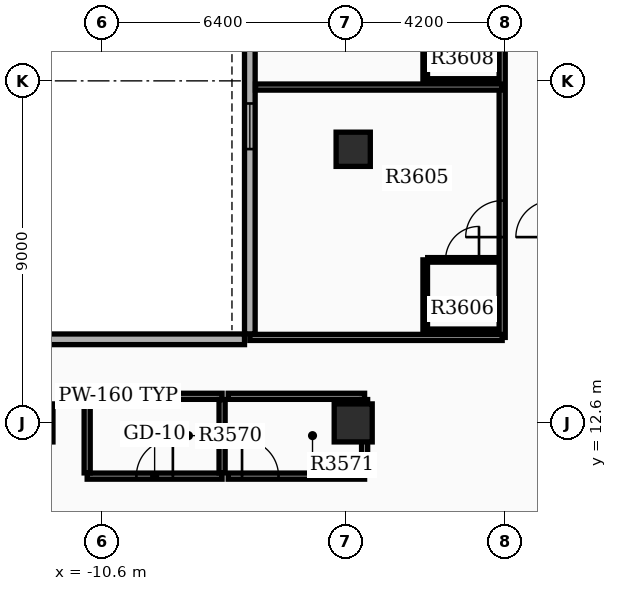
"""IFC4 building model, lengths in metres.
Left out: names, types, materials, properties, quantities, classifications, styles, units other than length and angle.
Written with IfcOpenShell. Run it as: python <this file> out.ifc"""

import sys

from ifc_helpers import new_model, si_unit, direction, frame, frame_2d, origin, origin_2d, place, context, subcontext, project, spatial, rectangle, extrude, element, fill, save


model = new_model("IFC4")
c1 = context("Model", 3, precision=1e-05, world=origin(), true_north=direction((0.0, 1.0)))
c2 = subcontext(c1, "Body", "Model", "MODEL_VIEW")
j1 = project(units=[si_unit("LENGTHUNIT", "METRE"), si_unit("PLANEANGLEUNIT", "RADIAN")], contexts=[c1])
p1 = place(None, origin())
s1 = spatial("IfcSite", under=j1, at=p1, CompositionType="ELEMENT")
p2 = place(p1, origin())
s2 = spatial("IfcBuilding", under=s1, at=p2, CompositionType="ELEMENT")
p3 = place(p2, frame((0.0, 0.0, 224.7)))
s3 = spatial("IfcBuildingStorey", under=s2, at=p3, CompositionType="ELEMENT", Elevation=224.7)
for number, where, z_axis, x_axis in (
    (1, (-12.4, 12.6, 0.0), (0.0, 0.0, 1.0), (1.0, 0.0, 0.0)),
    (2, (-4.0, 12.6, 0.0), (0.0, 0.0, 1.0), (1.0, 0.0, 0.0)),
):
    element("IfcColumn", number, at=place(p3, frame(where, z_axis=z_axis, x_axis=x_axis)), inside=s3, PredefinedType="COLUMN", context=c2, shape_type="SweptSolid", body=[
        extrude(rectangle(XDim=1.0, YDim=1.0, at=origin_2d()), origin(), (0.0, 0.0, 1.0), 3.9),
    ])
p4 = place(p3, frame((-4.0, 19.8, 0.0), z_axis=(0.0, 0.0, 1.0), x_axis=(1.0, 0.0, 0.0)))
e3 = element("IfcColumn", 3, at=p4, inside=s3, PredefinedType="COLUMN", context=c2, shape_type="SweptSolid", body=[
    extrude(rectangle(XDim=0.9, YDim=0.9, at=origin_2d()), origin(), (0.0, 0.0, 1.0), 3.9),
])
p5 = place(p3, frame((-6.72, 35.04, 0.0), z_axis=(0.0, 0.0, 1.0), x_axis=(0.0, -1.0, 0.0)))
e4 = element("IfcWall", 4, at=p5, inside=s3, PredefinedType="STANDARD", context=c2, shape_type="SweptSolid", body=[
    extrude(rectangle(XDim=20.1, YDim=0.28, at=frame_2d((10.05, 0.0))), origin(), (0.0, 0.0, 1.0), 3.18),
])
p6 = place(p5, frame((0.85, 0.0, 0.8)))
e5 = element("IfcOpeningElement", 5, at=p6, cuts=e4, PredefinedType="OPENING", context=c2, shape_type="SweptSolid", body=[
    extrude(rectangle(XDim=1.2, YDim=1.6, at=frame_2d((0.6, 0.8))), frame((0.0, 0.15, 0.0), z_axis=(0.0, -1.0, 0.0), x_axis=(1.0, 0.0, 0.0)), (0.0, 0.0, 1.0), 0.3),
])
p7 = place(p5, frame((4.05, 0.0, 0.8)))
e6 = element("IfcOpeningElement", 6, at=p7, cuts=e4, PredefinedType="OPENING", context=c2, shape_type="SweptSolid", body=[
    extrude(rectangle(XDim=1.2, YDim=1.6, at=frame_2d((0.6, 0.8))), frame((0.0, 0.15, 0.0), z_axis=(0.0, -1.0, 0.0), x_axis=(1.0, 0.0, 0.0)), (0.0, 0.0, 1.0), 0.3),
])
p8 = place(p5, frame((7.25, 0.0, 0.8)))
e7 = element("IfcOpeningElement", 7, at=p8, cuts=e4, PredefinedType="OPENING", context=c2, shape_type="SweptSolid", body=[
    extrude(rectangle(XDim=1.2, YDim=1.6, at=frame_2d((0.6, 0.8))), frame((0.0, 0.15, 0.0), z_axis=(0.0, -1.0, 0.0), x_axis=(1.0, 0.0, 0.0)), (0.0, 0.0, 1.0), 0.3),
])
p9 = place(p5, frame((10.45, 0.0, 0.8)))
e8 = element("IfcOpeningElement", 8, at=p9, cuts=e4, PredefinedType="OPENING", context=c2, shape_type="SweptSolid", body=[
    extrude(rectangle(XDim=1.2, YDim=1.6, at=frame_2d((0.6, 0.8))), frame((0.0, 0.15, 0.0), z_axis=(0.0, -1.0, 0.0), x_axis=(1.0, 0.0, 0.0)), (0.0, 0.0, 1.0), 0.3),
])
p10 = place(p5, frame((14.035, 0.0, 0.85)))
e9 = element("IfcOpeningElement", 9, at=p10, cuts=e4, PredefinedType="OPENING", context=c2, shape_type="SweptSolid", body=[
    extrude(rectangle(XDim=1.2, YDim=1.6, at=frame_2d((0.6, 0.8))), frame((0.0, 0.15, 0.0), z_axis=(0.0, -1.0, 0.0), x_axis=(1.0, 0.0, 0.0)), (0.0, 0.0, 1.0), 0.3),
])
p11 = place(p3, frame((-13.16, 14.8, 0.0), z_axis=(0.0, 0.0, 1.0), x_axis=(1.0, 0.0, 0.0)))
e10 = element("IfcWall", 10, at=p11, inside=s3, PredefinedType="STANDARD", context=c2, shape_type="SweptSolid", body=[
    extrude(rectangle(XDim=6.3, YDim=0.28, at=frame_2d((3.15, 0.0))), origin(), (0.0, 0.0, 1.0), 3.18),
])
p12 = place(p3, frame((-11.0, 11.2, 0.0), z_axis=(0.0, 0.0, 1.0), x_axis=(1.0, 0.0, 0.0)))
e11 = element("IfcWall", 11, at=p12, inside=s3, PredefinedType="PARTITIONING", context=c2, shape_type="SweptSolid", body=[
    extrude(rectangle(XDim=3.55, YDim=0.16, at=frame_2d((1.775, 0.0))), origin(), (0.0, 0.0, 1.0), 3.17),
])
p13 = place(p12, frame((1.295, 0.0, 0.0)))
e12 = element("IfcOpeningElement", 12, at=p13, cuts=e11, PredefinedType="OPENING", context=c2, shape_type="SweptSolid", body=[
    extrude(rectangle(XDim=0.96, YDim=2.15, at=frame_2d((0.48, 1.075))), frame((0.0, 0.09, 0.0), z_axis=(0.0, -1.0, 0.0), x_axis=(1.0, 0.0, 0.0)), (0.0, 0.0, 1.0), 0.18),
])
p14 = place(p3, frame((-11.0, 13.3, 0.0), z_axis=(0.0, 0.0, 1.0), x_axis=(1.0, 0.0, 0.0)))
e13 = element("IfcWall", 13, at=p14, inside=s3, PredefinedType="PARTITIONING", context=c2, shape_type="SweptSolid", body=[
    extrude(rectangle(XDim=3.55, YDim=0.16, at=frame_2d((1.775, 0.0))), origin(), (0.0, 0.0, 1.0), 3.17),
])
for number, where, z_axis, x_axis in (
    (14, (-11.0, 11.285, 0.0), (0.0, 0.0, 1.0), (0.0, 1.0, 0.0)),
    (15, (-7.45, 11.285, 0.0), (0.0, 0.0, 1.0), (0.0, 1.0, 0.0)),
):
    element("IfcWall", number, at=place(p3, frame(where, z_axis=z_axis, x_axis=x_axis)), inside=s3, PredefinedType="PARTITIONING", context=c2, shape_type="SweptSolid", body=[
        extrude(rectangle(XDim=1.93, YDim=0.16, at=frame_2d((0.965, 0.0))), origin(), (0.0, 0.0, 1.0), 3.17),
    ])
p15 = place(p3, frame((-7.29, 11.2, 0.0), z_axis=(0.0, 0.0, 1.0), x_axis=(1.0, 0.0, 0.0)))
e16 = element("IfcWall", 16, at=p15, inside=s3, PredefinedType="PARTITIONING", context=c2, shape_type="SweptSolid", body=[
    extrude(rectangle(XDim=3.59, YDim=0.16, at=frame_2d((1.795, 0.0))), origin(), (0.0, 0.0, 1.0), 3.17),
])
p16 = place(p15, frame((0.365, 0.0, 0.0)))
e17 = element("IfcOpeningElement", 17, at=p16, cuts=e16, PredefinedType="OPENING", context=c2, shape_type="SweptSolid", body=[
    extrude(rectangle(XDim=0.96, YDim=2.15, at=frame_2d((0.48, 1.075))), frame((0.0, 0.09, 0.0), z_axis=(0.0, -1.0, 0.0), x_axis=(1.0, 0.0, 0.0)), (0.0, 0.0, 1.0), 0.18),
])
p17 = place(p3, frame((-7.29, 13.3, 0.0), z_axis=(0.0, 0.0, 1.0), x_axis=(1.0, 0.0, 0.0)))
e18 = element("IfcWall", 18, at=p17, inside=s3, PredefinedType="PARTITIONING", context=c2, shape_type="SweptSolid", body=[
    extrude(rectangle(XDim=3.59, YDim=0.16, at=frame_2d((1.795, 0.0))), origin(), (0.0, 0.0, 1.0), 3.17),
])
p18 = place(p3, frame((-3.7, 11.285, 0.0), z_axis=(0.0, 0.0, 1.0), x_axis=(0.0, 1.0, 0.0)))
e19 = element("IfcWall", 19, at=p18, inside=s3, PredefinedType="PARTITIONING", context=c2, shape_type="SweptSolid", body=[
    extrude(rectangle(XDim=1.93, YDim=0.16, at=frame_2d((0.965, 0.0))), origin(), (0.0, 0.0, 1.0), 3.17),
])
p19 = place(p3, frame((-0.08, 14.85, 0.0), z_axis=(0.0, 0.0, 1.0), x_axis=(0.0, 1.0, 0.0)))
e20 = element("IfcWall", 20, at=p19, inside=s3, PredefinedType="PARTITIONING", context=c2, shape_type="SweptSolid", body=[
    extrude(rectangle(XDim=20.182, YDim=0.16, at=frame_2d((10.091, 0.0))), origin(), (0.0, 0.0, 1.0), 3.17),
])
p20 = place(p19, frame((2.639, 0.0, 0.0)))
e21 = element("IfcOpeningElement", 21, at=p20, cuts=e20, PredefinedType="OPENING", context=c2, shape_type="SweptSolid", body=[
    extrude(rectangle(XDim=0.96, YDim=2.15, at=frame_2d((0.48, 1.075))), frame((0.0, 0.09, 0.0), z_axis=(0.0, -1.0, 0.0), x_axis=(1.0, 0.0, 0.0)), (0.0, 0.0, 1.0), 0.18),
])
p21 = place(p19, frame((9.273, 0.0, 0.0)))
e22 = element("IfcOpeningElement", 22, at=p21, cuts=e20, PredefinedType="OPENING", context=c2, shape_type="SweptSolid", body=[
    extrude(rectangle(XDim=0.96, YDim=2.15, at=frame_2d((0.48, 1.075))), frame((0.0, 0.09, 0.0), z_axis=(0.0, -1.0, 0.0), x_axis=(1.0, 0.0, 0.0)), (0.0, 0.0, 1.0), 0.18),
])
p22 = place(p19, frame((16.614, 0.0, 0.0)))
e23 = element("IfcOpeningElement", 23, at=p22, cuts=e20, PredefinedType="OPENING", context=c2, shape_type="SweptSolid", body=[
    extrude(rectangle(XDim=0.96, YDim=2.15, at=frame_2d((0.48, 1.075))), frame((0.0, 0.09, 0.0), z_axis=(0.0, -1.0, 0.0), x_axis=(1.0, 0.0, 0.0)), (0.0, 0.0, 1.0), 0.18),
])
p23 = place(p3, frame((-0.08, 14.85, 0.0), z_axis=(0.0, 0.0, 1.0), x_axis=(-1.0, 0.0, 0.0)))
e24 = element("IfcWall", 24, at=p23, inside=s3, PredefinedType="PARTITIONING", context=c2, shape_type="SweptSolid", body=[
    extrude(rectangle(XDim=6.64, YDim=0.16, at=frame_2d((3.32, 0.0))), origin(), (0.0, 0.0, 1.0), 3.17),
])
p24 = place(p3, frame((-0.08, 21.437, 0.0), z_axis=(0.0, 0.0, 1.0), x_axis=(-1.0, 0.0, 0.0)))
e25 = element("IfcWall", 25, at=p24, inside=s3, PredefinedType="PARTITIONING", context=c2, shape_type="SweptSolid", body=[
    extrude(rectangle(XDim=6.492, YDim=0.16, at=frame_2d((3.246, 0.0))), origin(), (0.0, 0.0, 1.0), 3.17),
])
p25 = place(p3, frame((-2.04, 16.89, 0.0), z_axis=(0.0, 0.0, 1.0), x_axis=(1.0, 0.0, 0.0)))
e26 = element("IfcWall", 26, at=p25, inside=s3, PredefinedType="PARTITIONING", context=c2, shape_type="SweptSolid", body=[
    extrude(rectangle(XDim=1.82, YDim=0.12, at=frame_2d((0.91, 0.0))), origin(), (0.0, 0.0, 1.0), 3.17),
])
p26 = place(p25, frame((0.47, 0.0, 0.0)))
e27 = element("IfcOpeningElement", 27, at=p26, cuts=e26, PredefinedType="OPENING", context=c2, shape_type="SweptSolid", body=[
    extrude(rectangle(XDim=0.88, YDim=2.1, at=frame_2d((0.44, 1.05))), frame((0.0, 0.07, 0.0), z_axis=(0.0, -1.0, 0.0), x_axis=(1.0, 0.0, 0.0)), (0.0, 0.0, 1.0), 0.14),
])
p27 = place(p3, frame((-2.04, 15.01, 0.0), z_axis=(0.0, 0.0, 1.0), x_axis=(1.0, 0.0, 0.0)))
e28 = element("IfcWall", 28, at=p27, inside=s3, PredefinedType="PARTITIONING", context=c2, shape_type="SweptSolid", body=[
    extrude(rectangle(XDim=1.82, YDim=0.12, at=frame_2d((0.91, 0.0))), origin(), (0.0, 0.0, 1.0), 3.17),
])
p28 = place(p3, frame((-2.105, 15.01, 0.0), z_axis=(0.0, 0.0, 1.0), x_axis=(0.0, 1.0, 0.0)))
e29 = element("IfcWall", 29, at=p28, inside=s3, PredefinedType="PARTITIONING", context=c2, shape_type="SweptSolid", body=[
    extrude(rectangle(XDim=1.88, YDim=0.12, at=frame_2d((0.94, 0.0))), origin(), (0.0, 0.0, 1.0), 3.17),
])
p29 = place(p3, frame((-2.04, 21.597, 0.0), z_axis=(0.0, 0.0, 1.0), x_axis=(1.0, 0.0, 0.0)))
e30 = element("IfcWall", 30, at=p29, inside=s3, PredefinedType="PARTITIONING", context=c2, shape_type="SweptSolid", body=[
    extrude(rectangle(XDim=1.82, YDim=0.12, at=frame_2d((0.91, 0.0))), origin(), (0.0, 0.0, 1.0), 3.17),
])
p30 = place(p3, frame((-2.105, 21.597, 0.0), z_axis=(0.0, 0.0, 1.0), x_axis=(0.0, 1.0, 0.0)))
e31 = element("IfcWall", 31, at=p30, inside=s3, PredefinedType="PARTITIONING", context=c2, shape_type="SweptSolid", body=[
    extrude(rectangle(XDim=1.88, YDim=0.12, at=frame_2d((0.94, 0.0))), origin(), (0.0, 0.0, 1.0), 3.17),
])
p31 = place(p10, origin())
e32 = element("IfcWindow", 32, at=p31, inside=s3, PartitioningType="SINGLE_PANEL", PredefinedType="WINDOW", context=c2, shape_type="SweptSolid", body=[
    extrude(rectangle(XDim=1.2, YDim=1.6, at=frame_2d((0.6, 0.8))), frame((0.0, 0.03, 0.0), z_axis=(0.0, -1.0, 0.0), x_axis=(1.0, 0.0, 0.0)), (0.0, 0.0, 1.0), 0.06),
])
fill(e9, e32)
p32 = place(p13, origin())
e33 = element("IfcDoor", 33, at=p32, inside=s3, OperationType="SINGLE_SWING_RIGHT", PredefinedType="DOOR", context=c2, shape_type="SweptSolid", body=[
    extrude(rectangle(XDim=0.96, YDim=2.15, at=frame_2d((0.48, 1.075))), frame((0.0, 0.025, 0.0), z_axis=(0.0, -1.0, 0.0), x_axis=(1.0, 0.0, 0.0)), (0.0, 0.0, 1.0), 0.05),
])
fill(e12, e33)
p33 = place(p16, origin())
e34 = element("IfcDoor", 34, at=p33, inside=s3, OperationType="SINGLE_SWING_LEFT", PredefinedType="DOOR", context=c2, shape_type="SweptSolid", body=[
    extrude(rectangle(XDim=0.96, YDim=2.15, at=frame_2d((0.48, 1.075))), frame((0.0, 0.025, 0.0), z_axis=(0.0, -1.0, 0.0), x_axis=(1.0, 0.0, 0.0)), (0.0, 0.0, 1.0), 0.05),
])
fill(e17, e34)
p34 = place(p20, origin())
e35 = element("IfcDoor", 35, at=p34, inside=s3, OperationType="SINGLE_SWING_LEFT", PredefinedType="DOOR", context=c2, shape_type="SweptSolid", body=[
    extrude(rectangle(XDim=0.96, YDim=2.15, at=frame_2d((0.48, 1.075))), frame((0.0, 0.025, 0.0), z_axis=(0.0, -1.0, 0.0), x_axis=(1.0, 0.0, 0.0)), (0.0, 0.0, 1.0), 0.05),
])
fill(e21, e35)
p35 = place(p26, origin())
e36 = element("IfcDoor", 36, at=p35, inside=s3, OperationType="SINGLE_SWING_RIGHT", PredefinedType="DOOR", context=c2, shape_type="SweptSolid", body=[
    extrude(rectangle(XDim=0.88, YDim=2.1, at=frame_2d((0.44, 1.05))), frame((0.0, 0.025, 0.0), z_axis=(0.0, -1.0, 0.0), x_axis=(1.0, 0.0, 0.0)), (0.0, 0.0, 1.0), 0.05),
])
fill(e27, e36)
save(model, sys.argv[1])
